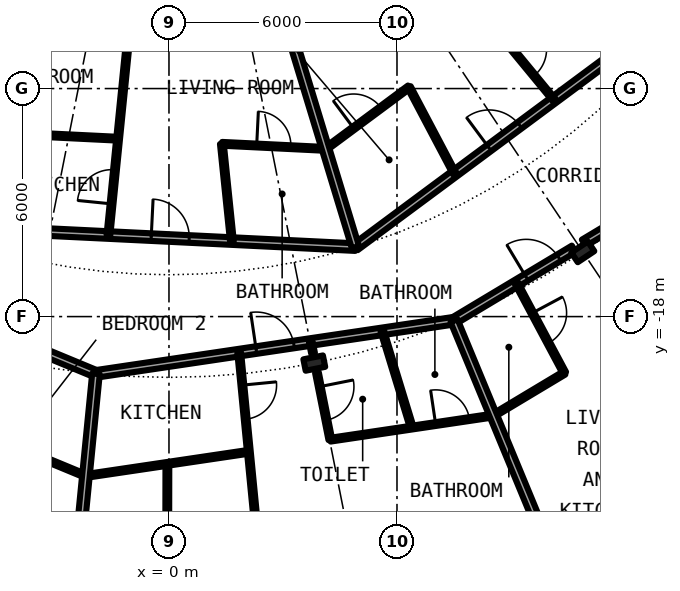
"""IFC4 building model, lengths in metres.
Left out: names, types, materials, properties, quantities, classifications, styles, units other than length and angle.
Written with IfcOpenShell. Run it as: python <this file> out.ifc"""

import sys

from ifc_helpers import new_model, si_unit, direction, frame, frame_2d, origin, origin_2d, place, context, subcontext, project, spatial, rectangle, i_section, extrude, element, fill, save


model = new_model("IFC4")
c1 = context("Model", 3, precision=1e-05, world=origin(), true_north=direction((0.0, 1.0)))
c2 = subcontext(c1, "Body", "Model", "MODEL_VIEW")
j1 = project(units=[si_unit("LENGTHUNIT", "METRE"), si_unit("PLANEANGLEUNIT", "RADIAN")], contexts=[c1])
p1 = place(None, origin())
s1 = spatial("IfcSite", under=j1, at=p1, CompositionType="ELEMENT")
p2 = place(p1, origin())
s2 = spatial("IfcBuilding", under=s1, at=p2, CompositionType="ELEMENT")
p3 = place(p2, frame((0.0, 0.0, 75.8)))
s3 = spatial("IfcBuildingStorey", under=s2, at=p3, CompositionType="ELEMENT", Elevation=75.8)
for number, where, z_axis, x_axis in (
    (1, (3.824, -19.223, 0.0), (0.0, 0.0, 1.0), (0.195, -0.981, 0.0)),
    (2, (10.889, -16.297, 0.0), (0.0, 0.0, 1.0), (0.556, -0.831, 0.0)),
):
    element("IfcColumn", number, at=place(p3, frame(where, z_axis=z_axis, x_axis=x_axis)), inside=s3, PredefinedType="COLUMN", context=c2, shape_type="SweptSolid", body=[
        extrude(i_section(OverallWidth=0.306, OverallDepth=0.524, WebThickness=0.021, FlangeThickness=0.04, FilletRadius=0.027, at=origin_2d()), origin(), (0.0, 0.0, 1.0), 3.05),
    ])
p4 = place(p3, frame((10.447, -25.222, 0.0), z_axis=(0.0, 0.0, 1.0), x_axis=(0.881915646801, 0.471407246368, 0.0)))
e3 = element("IfcWall", 3, at=p4, inside=s3, PredefinedType="SOLIDWALL", context=c2, shape_type="SweptSolid", body=[
    extrude(rectangle(XDim=5.352, YDim=0.25, at=frame_2d((2.676, 0.0))), origin(), (0.0, 0.0, 1.0), 2.7),
])
p5 = place(p4, frame((0.441, 0.0, 0.3)))
e4 = element("IfcOpeningElement", 4, at=p5, cuts=e3, PredefinedType="OPENING", context=c2, shape_type="SweptSolid", body=[
    extrude(rectangle(XDim=1.8, YDim=2.1, at=frame_2d((0.9, 1.05))), frame((0.0, 0.135, 0.0), z_axis=(0.0, -1.0, 0.0), x_axis=(1.0, 0.0, 0.0)), (0.0, 0.0, 1.0), 0.27),
])
p6 = place(p4, frame((3.51, 0.0, 0.0)))
e5 = element("IfcOpeningElement", 5, at=p6, cuts=e3, PredefinedType="OPENING", context=c2, shape_type="SweptSolid", body=[
    extrude(rectangle(XDim=1.0, YDim=2.2, at=frame_2d((0.5, 1.1))), frame((0.0, 0.135, 0.0), z_axis=(0.0, -1.0, 0.0), x_axis=(1.0, 0.0, 0.0)), (0.0, 0.0, 1.0), 0.27),
])
p7 = place(p3, frame((8.534, -20.604, 0.0), z_axis=(0.0, 0.0, 1.0), x_axis=(0.857611386679, 0.514298268943, 0.0)))
e6 = element("IfcWall", 6, at=p7, inside=s3, PredefinedType="PARTITIONING", context=c2, shape_type="SweptSolid", body=[
    extrude(rectangle(XDim=2.182, YDim=0.1, at=frame_2d((1.091, 0.0))), origin(), (0.0, 0.0, 1.0), 2.7),
])
p8 = place(p3, frame((-2.186, -22.193, 0.0), z_axis=(0.0, 0.0, 1.0), x_axis=(0.989171386505, 0.146765009863, 0.0)))
e7 = element("IfcWall", 7, at=p8, inside=s3, PredefinedType="PARTITIONING", context=c2, shape_type="SweptSolid", body=[
    extrude(rectangle(XDim=4.335, YDim=0.1, at=frame_2d((2.167, 0.0))), origin(), (0.0, 0.0, 1.0), 2.7),
])
p9 = place(p3, frame((4.246, -21.239, 0.0), z_axis=(0.0, 0.0, 1.0), x_axis=(0.989178348771, 0.146718077695, 0.0)))
e8 = element("IfcWall", 8, at=p9, inside=s3, PredefinedType="PARTITIONING", context=c2, shape_type="SweptSolid", body=[
    extrude(rectangle(XDim=4.335, YDim=0.1, at=frame_2d((2.167, 0.0))), origin(), (0.0, 0.0, 1.0), 2.7),
])
p10 = place(p9, frame((2.801, 0.0, 0.0)))
e9 = element("IfcOpeningElement", 9, at=p10, cuts=e8, PredefinedType="OPENING", context=c2, shape_type="SweptSolid", body=[
    extrude(rectangle(XDim=0.9, YDim=2.3, at=frame_2d((0.45, 1.15))), frame((0.0, 0.06, 0.0), z_axis=(0.0, -1.0, 0.0), x_axis=(1.0, 0.0, 0.0)), (0.0, 0.0, 1.0), 0.12),
])
p11 = place(p3, frame((-8.168, -19.716, 0.0), z_axis=(0.0, 0.0, 1.0), x_axis=(0.923791567638, -0.382895729358, 0.0)))
e10 = element("IfcWall", 10, at=p11, inside=s3, PredefinedType="PARTITIONING", context=c2, shape_type="SweptSolid", body=[
    extrude(rectangle(XDim=6.474, YDim=0.1, at=frame_2d((3.237, 0.0))), origin(), (0.0, 0.0, 1.0), 2.7),
])
p12 = place(p3, frame((7.495, -18.111, 0.0), z_axis=(0.0, 0.0, 1.0), x_axis=(0.857697633371, 0.514154422046, 0.0)))
e11 = element("IfcWall", 11, at=p12, inside=s3, PredefinedType="PARTITIONING", context=c2, shape_type="SweptSolid", body=[
    extrude(rectangle(XDim=3.682, YDim=0.2, at=frame_2d((1.841, 0.0))), origin(), (0.0, 0.0, 1.0), 2.38),
])
p13 = place(p12, frame((2.224, 0.0, 0.0)))
e12 = element("IfcOpeningElement", 12, at=p13, cuts=e11, PredefinedType="OPENING", context=c2, shape_type="SweptSolid", body=[
    extrude(rectangle(XDim=1.0, YDim=2.3, at=frame_2d((0.5, 1.15))), frame((0.0, 0.11, 0.0), z_axis=(0.0, -1.0, 0.0), x_axis=(1.0, 0.0, 0.0)), (0.0, 0.0, 1.0), 0.22),
])
p14 = place(p3, frame((10.916, -16.061, 0.0), z_axis=(0.0, 0.0, 1.0), x_axis=(0.857663265693, 0.514211748875, 0.0)))
e13 = element("IfcWall", 13, at=p14, inside=s3, PredefinedType="PARTITIONING", context=c2, shape_type="SweptSolid", body=[
    extrude(rectangle(XDim=1.77, YDim=0.2, at=frame_2d((0.885, 0.0))), origin(), (0.0, 0.0, 1.0), 2.38),
])
p15 = place(p3, frame((-1.918, -19.507, 0.0), z_axis=(0.0, 0.0, 1.0), x_axis=(0.989144916871, 0.146943300045, 0.0)))
e14 = element("IfcWall", 14, at=p15, inside=s3, PredefinedType="PARTITIONING", context=c2, shape_type="SweptSolid", body=[
    extrude(rectangle(XDim=9.529, YDim=0.2, at=frame_2d((4.764, 0.0))), origin(), (0.0, 0.0, 1.0), 2.38),
])
p16 = place(p15, frame((4.261, 0.0, 0.0)))
e15 = element("IfcOpeningElement", 15, at=p16, cuts=e14, PredefinedType="OPENING", context=c2, shape_type="SweptSolid", body=[
    extrude(rectangle(XDim=1.0, YDim=2.3, at=frame_2d((0.5, 1.15))), frame((0.0, 0.11, 0.0), z_axis=(0.0, -1.0, 0.0), x_axis=(1.0, 0.0, 0.0)), (0.0, 0.0, 1.0), 0.22),
])
p17 = place(p3, frame((-12.436, -15.15, 0.0), z_axis=(0.0, 0.0, 1.0), x_axis=(0.923858130651, -0.38273509694, 0.0)))
e16 = element("IfcWall", 16, at=p17, inside=s3, PredefinedType="PARTITIONING", context=c2, shape_type="SweptSolid", body=[
    extrude(rectangle(XDim=11.382, YDim=0.2, at=frame_2d((5.691, 0.0))), origin(), (0.0, 0.0, 1.0), 2.7),
])
p18 = place(p17, frame((4.239, 0.0, 0.0)))
e17 = element("IfcOpeningElement", 17, at=p18, cuts=e16, PredefinedType="OPENING", context=c2, shape_type="SweptSolid", body=[
    extrude(rectangle(XDim=1.0, YDim=2.3, at=frame_2d((0.5, 1.15))), frame((0.0, 0.11, 0.0), z_axis=(0.0, -1.0, 0.0), x_axis=(1.0, 0.0, 0.0)), (0.0, 0.0, 1.0), 0.22),
])
p19 = place(p3, frame((-6.464, -15.616, 0.0), z_axis=(0.0, 0.0, 1.0), x_axis=(0.998805876564, -0.048855101495, 0.0)))
e18 = element("IfcWall", 18, at=p19, inside=s3, PredefinedType="PARTITIONING", context=c2, shape_type="SweptSolid", body=[
    extrude(rectangle(XDim=11.384, YDim=0.2, at=frame_2d((5.692, 0.0))), origin(), (0.0, 0.0, 1.0), 2.7),
])
p20 = place(p19, frame((6.004, 0.0, 0.0)))
e19 = element("IfcOpeningElement", 19, at=p20, cuts=e18, PredefinedType="OPENING", context=c2, shape_type="SweptSolid", body=[
    extrude(rectangle(XDim=1.0, YDim=2.3, at=frame_2d((0.5, 1.15))), frame((0.0, 0.11, 0.0), z_axis=(0.0, -1.0, 0.0), x_axis=(1.0, 0.0, 0.0)), (0.0, 0.0, 1.0), 0.22),
])
p21 = place(p3, frame((4.906, -16.172, 0.0), z_axis=(0.0, 0.0, 1.0), x_axis=(0.803191461888, 0.595720971219, 0.0)))
e20 = element("IfcWall", 20, at=p21, inside=s3, PredefinedType="PARTITIONING", context=c2, shape_type="SweptSolid", body=[
    extrude(rectangle(XDim=9.76, YDim=0.2, at=frame_2d((4.88, 0.0))), origin(), (0.0, 0.0, 1.0), 2.7),
])
p22 = place(p21, frame((4.38, 0.0, 0.0)))
e21 = element("IfcOpeningElement", 21, at=p22, cuts=e20, PredefinedType="OPENING", context=c2, shape_type="SweptSolid", body=[
    extrude(rectangle(XDim=1.0, YDim=2.3, at=frame_2d((0.5, 1.15))), frame((0.0, 0.11, 0.0), z_axis=(0.0, -1.0, 0.0), x_axis=(1.0, 0.0, 0.0)), (0.0, 0.0, 1.0), 0.22),
])
p23 = place(p3, frame((-5.434, -13.119, 0.0), z_axis=(0.0, 0.0, 1.0), x_axis=(0.998795469779, -0.049067398026, 0.0)))
e22 = element("IfcWall", 22, at=p23, inside=s3, PredefinedType="PARTITIONING", context=c2, shape_type="SweptSolid", body=[
    extrude(rectangle(XDim=4.1, YDim=0.1, at=frame_2d((2.05, 0.0))), origin(), (0.0, 0.0, 1.0), 2.7),
])
p24 = place(p3, frame((1.397, -13.454, 0.0), z_axis=(0.0, 0.0, 1.0), x_axis=(0.99880129942, -0.048948588095, 0.0)))
e23 = element("IfcWall", 23, at=p24, inside=s3, PredefinedType="PARTITIONING", context=c2, shape_type="SweptSolid", body=[
    extrude(rectangle(XDim=2.733, YDim=0.1, at=frame_2d((1.367, 0.0))), origin(), (0.0, 0.0, 1.0), 2.7),
])
p25 = place(p24, frame((0.912, 0.0, 0.0)))
e24 = element("IfcOpeningElement", 24, at=p25, cuts=e23, PredefinedType="OPENING", context=c2, shape_type="SweptSolid", body=[
    extrude(rectangle(XDim=0.9, YDim=2.3, at=frame_2d((0.45, 1.15))), frame((0.0, 0.06, 0.0), z_axis=(0.0, -1.0, 0.0), x_axis=(1.0, 0.0, 0.0)), (0.0, 0.0, 1.0), 0.12),
])
p26 = place(p3, frame((4.123, -13.589, 0.0), z_axis=(0.0, 0.0, 1.0), x_axis=(0.803128348509, 0.595806055542, 0.0)))
e25 = element("IfcWall", 25, at=p26, inside=s3, PredefinedType="PARTITIONING", context=c2, shape_type="SweptSolid", body=[
    extrude(rectangle(XDim=2.734, YDim=0.1, at=frame_2d((1.367, 0.0))), origin(), (0.0, 0.0, 1.0), 2.7),
])
p27 = place(p26, frame((0.916, 0.0, 0.0)))
e26 = element("IfcOpeningElement", 26, at=p27, cuts=e25, PredefinedType="OPENING", context=c2, shape_type="SweptSolid", body=[
    extrude(rectangle(XDim=0.9, YDim=2.3, at=frame_2d((0.45, 1.15))), frame((0.0, 0.06, 0.0), z_axis=(0.0, -1.0, 0.0), x_axis=(1.0, 0.0, 0.0)), (0.0, 0.0, 1.0), 0.12),
])
p28 = place(p3, frame((-6.467, -15.614, 0.0), z_axis=(0.0, 0.0, 1.0), x_axis=(0.382646942224, 0.923894646378, 0.0)))
e27 = element("IfcWall", 27, at=p28, inside=s3, PredefinedType="PARTITIONING", context=c2, shape_type="SweptSolid", body=[
    extrude(rectangle(XDim=9.181, YDim=0.2, at=frame_2d((4.59, 0.0))), origin(), (0.0, 0.0, 1.0), 2.7),
])
p29 = place(p3, frame((-2.664, -27.044, 0.0), z_axis=(0.0, 0.0, 1.0), x_axis=(0.098115395479, 0.995175044487, 0.0)))
e28 = element("IfcWall", 28, at=p29, inside=s3, PredefinedType="PARTITIONING", context=c2, shape_type="SweptSolid", body=[
    extrude(rectangle(XDim=7.574, YDim=0.2, at=frame_2d((3.787, 0.0))), origin(), (0.0, 0.0, 1.0), 2.7),
])
p30 = place(p3, frame((-1.593, -15.853, 0.0), z_axis=(0.0, 0.0, 1.0), x_axis=(0.100083483356, 0.994979043176, 0.0)))
e29 = element("IfcWall", 29, at=p30, inside=s3, PredefinedType="PARTITIONING", context=c2, shape_type="SweptSolid", body=[
    extrude(rectangle(XDim=8.213, YDim=0.1, at=frame_2d((4.107, 0.0))), origin(), (0.0, 0.0, 1.0), 2.7),
])
p31 = place(p30, frame((0.823, 0.0, 0.0)))
e30 = element("IfcOpeningElement", 30, at=p31, cuts=e29, PredefinedType="OPENING", context=c2, shape_type="SweptSolid", body=[
    extrude(rectangle(XDim=0.9, YDim=2.3, at=frame_2d((0.45, 1.15))), frame((0.0, 0.06, 0.0), z_axis=(0.0, -1.0, 0.0), x_axis=(1.0, 0.0, 0.0)), (0.0, 0.0, 1.0), 0.12),
])
p32 = place(p30, frame((4.931, 0.0, 0.0)))
e31 = element("IfcOpeningElement", 31, at=p32, cuts=e29, PredefinedType="OPENING", context=c2, shape_type="SweptSolid", body=[
    extrude(rectangle(XDim=0.9, YDim=2.3, at=frame_2d((0.45, 1.15))), frame((0.0, 0.06, 0.0), z_axis=(0.0, -1.0, 0.0), x_axis=(1.0, 0.0, 0.0)), (0.0, 0.0, 1.0), 0.12),
])
p33 = place(p3, frame((-0.052, -27.175, 0.0), z_axis=(0.0, 0.0, 1.0), x_axis=(0.001888614256, 0.999998216567, 0.0)))
e32 = element("IfcWall", 32, at=p33, inside=s3, PredefinedType="PARTITIONING", context=c2, shape_type="SweptSolid", body=[
    extrude(rectangle(XDim=5.3, YDim=0.1, at=frame_2d((2.65, 0.0))), origin(), (0.0, 0.0, 1.0), 2.7),
])
p34 = place(p33, frame((2.2, 0.0, 0.0)))
e33 = element("IfcOpeningElement", 33, at=p34, cuts=e32, PredefinedType="OPENING", context=c2, shape_type="SweptSolid", body=[
    extrude(rectangle(XDim=0.9, YDim=2.3, at=frame_2d((0.45, 1.15))), frame((0.0, 0.06, 0.0), z_axis=(0.0, -1.0, 0.0), x_axis=(1.0, 0.0, 0.0)), (0.0, 0.0, 1.0), 0.12),
])
p35 = place(p3, frame((1.392, -13.454, 0.0), z_axis=(0.0, 0.0, 1.0), x_axis=(0.102594773028, -0.994723234145, 0.0)))
e34 = element("IfcWall", 34, at=p35, inside=s3, PredefinedType="PARTITIONING", context=c2, shape_type="SweptSolid", body=[
    extrude(rectangle(XDim=2.573, YDim=0.1, at=frame_2d((1.286, 0.0))), origin(), (0.0, 0.0, 1.0), 2.7),
])
p36 = place(p3, frame((1.848, -18.947, 0.0), z_axis=(0.0, 0.0, 1.0), x_axis=(0.09695500902, -0.995288765246, 0.0)))
e35 = element("IfcWall", 35, at=p36, inside=s3, PredefinedType="PARTITIONING", context=c2, shape_type="SweptSolid", body=[
    extrude(rectangle(XDim=8.138, YDim=0.1, at=frame_2d((4.069, 0.0))), origin(), (0.0, 0.0, 1.0), 2.7),
])
p37 = place(p36, frame((0.861, 0.0, 0.0)))
e36 = element("IfcOpeningElement", 36, at=p37, cuts=e35, PredefinedType="OPENING", context=c2, shape_type="SweptSolid", body=[
    extrude(rectangle(XDim=0.9, YDim=2.3, at=frame_2d((0.45, 1.15))), frame((0.0, 0.06, 0.0), z_axis=(0.0, -1.0, 0.0), x_axis=(1.0, 0.0, 0.0)), (0.0, 0.0, 1.0), 0.12),
])
p38 = place(p36, frame((4.93, 0.0, 0.0)))
e37 = element("IfcOpeningElement", 37, at=p38, cuts=e35, PredefinedType="OPENING", context=c2, shape_type="SweptSolid", body=[
    extrude(rectangle(XDim=0.9, YDim=2.3, at=frame_2d((0.45, 1.15))), frame((0.0, 0.06, 0.0), z_axis=(0.0, -1.0, 0.0), x_axis=(1.0, 0.0, 0.0)), (0.0, 0.0, 1.0), 0.12),
])
p39 = place(p3, frame((2.24, -7.388, 0.0), z_axis=(0.0, 0.0, 1.0), x_axis=(0.290420725025, -0.956899055531, 0.0)))
e38 = element("IfcWall", 38, at=p39, inside=s3, PredefinedType="PARTITIONING", context=c2, shape_type="SweptSolid", body=[
    extrude(rectangle(XDim=9.18, YDim=0.2, at=frame_2d((4.59, 0.0))), origin(), (0.0, 0.0, 1.0), 2.7),
])
p40 = place(p3, frame((3.732, -18.667, 0.0), z_axis=(0.0, 0.0, 1.0), x_axis=(0.195804928618, -0.980642865639, 0.0)))
e39 = element("IfcWall", 39, at=p40, inside=s3, PredefinedType="PARTITIONING", context=c2, shape_type="SweptSolid", body=[
    extrude(rectangle(XDim=0.302, YDim=0.1, at=frame_2d((0.151, 0.0))), origin(), (0.0, 0.0, 1.0), 2.7),
])
p41 = place(p3, frame((3.894, -19.477, 0.0), z_axis=(0.0, 0.0, 1.0), x_axis=(0.195933221699, -0.980617240637, 0.0)))
e40 = element("IfcWall", 40, at=p41, inside=s3, PredefinedType="PARTITIONING", context=c2, shape_type="SweptSolid", body=[
    extrude(rectangle(XDim=1.797, YDim=0.1, at=frame_2d((0.898, 0.0))), origin(), (0.0, 0.0, 1.0), 2.7),
])
p42 = place(p41, frame((0.374, 0.0, 0.0)))
e41 = element("IfcOpeningElement", 41, at=p42, cuts=e40, PredefinedType="OPENING", context=c2, shape_type="SweptSolid", body=[
    extrude(rectangle(XDim=0.9, YDim=2.3, at=frame_2d((0.45, 1.15))), frame((0.0, 0.06, 0.0), z_axis=(0.0, -1.0, 0.0), x_axis=(1.0, 0.0, 0.0)), (0.0, 0.0, 1.0), 0.12),
])
p43 = place(p3, frame((4.908, -5.959, 0.0), z_axis=(0.0, 0.0, 1.0), x_axis=(0.636105207978, -0.771602335652, 0.0)))
e42 = element("IfcWall", 42, at=p43, inside=s3, PredefinedType="PARTITIONING", context=c2, shape_type="SweptSolid", body=[
    extrude(rectangle(XDim=8.213, YDim=0.1, at=frame_2d((4.106, 0.0))), origin(), (0.0, 0.0, 1.0), 2.7),
])
p44 = place(p43, frame((6.49, 0.0, 0.0)))
e43 = element("IfcOpeningElement", 43, at=p44, cuts=e42, PredefinedType="OPENING", context=c2, shape_type="SweptSolid", body=[
    extrude(rectangle(XDim=0.9, YDim=2.3, at=frame_2d((0.45, 1.15))), frame((0.0, 0.06, 0.0), z_axis=(0.0, -1.0, 0.0), x_axis=(1.0, 0.0, 0.0)), (0.0, 0.0, 1.0), 0.12),
])
p45 = place(p43, frame((2.384, 0.0, 0.0)))
e44 = element("IfcOpeningElement", 44, at=p45, cuts=e42, PredefinedType="OPENING", context=c2, shape_type="SweptSolid", body=[
    extrude(rectangle(XDim=0.9, YDim=2.3, at=frame_2d((0.45, 1.15))), frame((0.0, 0.06, 0.0), z_axis=(0.0, -1.0, 0.0), x_axis=(1.0, 0.0, 0.0)), (0.0, 0.0, 1.0), 0.12),
])
p46 = place(p3, frame((5.616, -18.388, 0.0), z_axis=(0.0, 0.0, 1.0), x_axis=(0.292206826201, -0.956355148845, 0.0)))
e45 = element("IfcWall", 45, at=p46, inside=s3, PredefinedType="PARTITIONING", context=c2, shape_type="SweptSolid", body=[
    extrude(rectangle(XDim=2.648, YDim=0.1, at=frame_2d((1.324, 0.0))), origin(), (0.0, 0.0, 1.0), 2.7),
])
p47 = place(p3, frame((6.316, -11.961, 0.0), z_axis=(0.0, 0.0, 1.0), x_axis=(0.467037016128, -0.884237765291, 0.0)))
e46 = element("IfcWall", 46, at=p47, inside=s3, PredefinedType="PARTITIONING", context=c2, shape_type="SweptSolid", body=[
    extrude(rectangle(XDim=2.572, YDim=0.1, at=frame_2d((1.286, 0.0))), origin(), (0.0, 0.0, 1.0), 2.7),
])
p48 = place(p3, frame((7.501, -18.108, 0.0), z_axis=(0.0, 0.0, 1.0), x_axis=(0.382600411313, -0.923913916587, 0.0)))
e47 = element("IfcWall", 47, at=p48, inside=s3, PredefinedType="PARTITIONING", context=c2, shape_type="SweptSolid", body=[
    extrude(rectangle(XDim=7.574, YDim=0.2, at=frame_2d((3.787, 0.0))), origin(), (0.0, 0.0, 1.0), 2.7),
])
p49 = place(p3, frame((9.145, -17.122, 0.0), z_axis=(0.0, 0.0, 1.0), x_axis=(0.471151994359, -0.882052038267, 0.0)))
e48 = element("IfcWall", 48, at=p49, inside=s3, PredefinedType="PARTITIONING", context=c2, shape_type="SweptSolid", body=[
    extrude(rectangle(XDim=2.674, YDim=0.1, at=frame_2d((1.337, 0.0))), origin(), (0.0, 0.0, 1.0), 2.7),
])
p50 = place(p49, frame((0.887, 0.0, 0.0)))
e49 = element("IfcOpeningElement", 49, at=p50, cuts=e48, PredefinedType="OPENING", context=c2, shape_type="SweptSolid", body=[
    extrude(rectangle(XDim=0.9, YDim=2.3, at=frame_2d((0.45, 1.15))), frame((0.0, 0.06, 0.0), z_axis=(0.0, -1.0, 0.0), x_axis=(1.0, 0.0, 0.0)), (0.0, 0.0, 1.0), 0.12),
])
p51 = place(p16, origin())
e50 = element("IfcDoor", 50, at=p51, inside=s3, OperationType="SINGLE_SWING_LEFT", PredefinedType="DOOR", context=c2, shape_type="SweptSolid", body=[
    extrude(rectangle(XDim=1.0, YDim=2.3, at=frame_2d((0.5, 1.15))), frame((0.0, 0.025, 0.0), z_axis=(0.0, -1.0, 0.0), x_axis=(1.0, 0.0, 0.0)), (0.0, 0.0, 1.0), 0.05),
])
fill(e15, e50)
p52 = place(p10, origin())
e51 = element("IfcDoor", 51, at=p52, inside=s3, OperationType="SINGLE_SWING_RIGHT", PredefinedType="DOOR", context=c2, shape_type="SweptSolid", body=[
    extrude(rectangle(XDim=0.9, YDim=2.3, at=frame_2d((0.45, 1.15))), frame((0.0, 0.025, 0.0), z_axis=(0.0, -1.0, 0.0), x_axis=(1.0, 0.0, 0.0)), (0.0, 0.0, 1.0), 0.05),
])
fill(e9, e51)
p53 = place(p42, origin())
e52 = element("IfcDoor", 52, at=p53, inside=s3, OperationType="SINGLE_SWING_LEFT", PredefinedType="DOOR", context=c2, shape_type="SweptSolid", body=[
    extrude(rectangle(XDim=0.9, YDim=2.3, at=frame_2d((0.45, 1.15))), frame((0.0, 0.025, 0.0), z_axis=(0.0, -1.0, 0.0), x_axis=(1.0, 0.0, 0.0)), (0.0, 0.0, 1.0), 0.05),
])
fill(e41, e52)
p54 = place(p37, origin())
e53 = element("IfcDoor", 53, at=p54, inside=s3, OperationType="SINGLE_SWING_LEFT", PredefinedType="DOOR", context=c2, shape_type="SweptSolid", body=[
    extrude(rectangle(XDim=0.9, YDim=2.3, at=frame_2d((0.45, 1.15))), frame((0.0, 0.025, 0.0), z_axis=(0.0, -1.0, 0.0), x_axis=(1.0, 0.0, 0.0)), (0.0, 0.0, 1.0), 0.05),
])
fill(e36, e53)
p55 = place(p13, origin())
e54 = element("IfcDoor", 54, at=p55, inside=s3, OperationType="SINGLE_SWING_RIGHT", PredefinedType="DOOR", context=c2, shape_type="SweptSolid", body=[
    extrude(rectangle(XDim=1.0, YDim=2.3, at=frame_2d((0.5, 1.15))), frame((0.0, 0.025, 0.0), z_axis=(0.0, -1.0, 0.0), x_axis=(1.0, 0.0, 0.0)), (0.0, 0.0, 1.0), 0.05),
])
fill(e12, e54)
p56 = place(p50, origin())
e55 = element("IfcDoor", 55, at=p56, inside=s3, OperationType="SINGLE_SWING_RIGHT", PredefinedType="DOOR", context=c2, shape_type="SweptSolid", body=[
    extrude(rectangle(XDim=0.9, YDim=2.3, at=frame_2d((0.45, 1.15))), frame((0.0, 0.025, 0.0), z_axis=(0.0, -1.0, 0.0), x_axis=(1.0, 0.0, 0.0)), (0.0, 0.0, 1.0), 0.05),
])
fill(e49, e55)
p57 = place(p20, origin())
e56 = element("IfcDoor", 56, at=p57, inside=s3, OperationType="SINGLE_SWING_RIGHT", PredefinedType="DOOR", context=c2, shape_type="SweptSolid", body=[
    extrude(rectangle(XDim=1.0, YDim=2.3, at=frame_2d((0.5, 1.15))), frame((0.0, 0.025, 0.0), z_axis=(0.0, -1.0, 0.0), x_axis=(1.0, 0.0, 0.0)), (0.0, 0.0, 1.0), 0.05),
])
fill(e19, e56)
p58 = place(p25, origin())
e57 = element("IfcDoor", 57, at=p58, inside=s3, OperationType="SINGLE_SWING_LEFT", PredefinedType="DOOR", context=c2, shape_type="SweptSolid", body=[
    extrude(rectangle(XDim=0.9, YDim=2.3, at=frame_2d((0.45, 1.15))), frame((0.0, 0.025, 0.0), z_axis=(0.0, -1.0, 0.0), x_axis=(1.0, 0.0, 0.0)), (0.0, 0.0, 1.0), 0.05),
])
fill(e24, e57)
p59 = place(p31, origin())
e58 = element("IfcDoor", 58, at=p59, inside=s3, OperationType="SINGLE_SWING_LEFT", PredefinedType="DOOR", context=c2, shape_type="SweptSolid", body=[
    extrude(rectangle(XDim=0.9, YDim=2.3, at=frame_2d((0.45, 1.15))), frame((0.0, 0.025, 0.0), z_axis=(0.0, -1.0, 0.0), x_axis=(1.0, 0.0, 0.0)), (0.0, 0.0, 1.0), 0.05),
])
fill(e30, e58)
p60 = place(p22, origin())
e59 = element("IfcDoor", 59, at=p60, inside=s3, OperationType="SINGLE_SWING_LEFT", PredefinedType="DOOR", context=c2, shape_type="SweptSolid", body=[
    extrude(rectangle(XDim=1.0, YDim=2.3, at=frame_2d((0.5, 1.15))), frame((0.0, 0.025, 0.0), z_axis=(0.0, -1.0, 0.0), x_axis=(1.0, 0.0, 0.0)), (0.0, 0.0, 1.0), 0.05),
])
fill(e21, e59)
p61 = place(p27, origin())
e60 = element("IfcDoor", 60, at=p61, inside=s3, OperationType="SINGLE_SWING_LEFT", PredefinedType="DOOR", context=c2, shape_type="SweptSolid", body=[
    extrude(rectangle(XDim=0.9, YDim=2.3, at=frame_2d((0.45, 1.15))), frame((0.0, 0.025, 0.0), z_axis=(0.0, -1.0, 0.0), x_axis=(1.0, 0.0, 0.0)), (0.0, 0.0, 1.0), 0.05),
])
fill(e26, e60)
p62 = place(p44, origin())
e61 = element("IfcDoor", 61, at=p62, inside=s3, OperationType="SINGLE_SWING_RIGHT", PredefinedType="DOOR", context=c2, shape_type="SweptSolid", body=[
    extrude(rectangle(XDim=0.9, YDim=2.3, at=frame_2d((0.45, 1.15))), frame((0.0, 0.025, 0.0), z_axis=(0.0, -1.0, 0.0), x_axis=(1.0, 0.0, 0.0)), (0.0, 0.0, 1.0), 0.05),
])
fill(e43, e61)
save(model, sys.argv[1])
